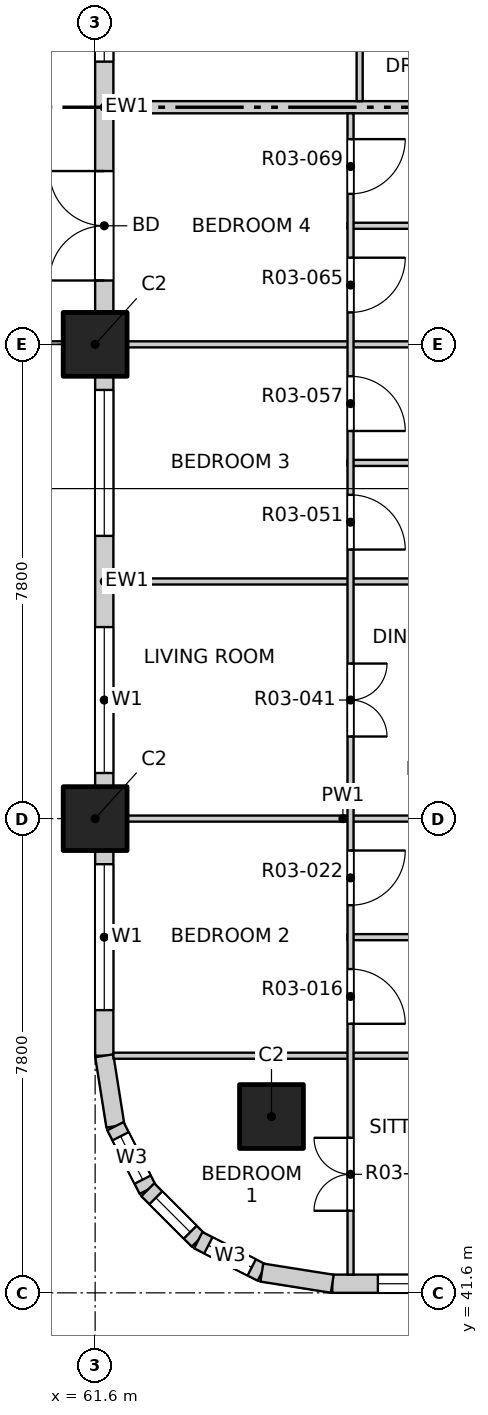
"""IFC4 building model, lengths in metres.
Left out: names, types, materials, properties, quantities, classifications, styles, units other than length and angle.
Written with IfcOpenShell. Run it as: python <this file> out.ifc"""

import sys

from ifc_helpers import new_model, si_unit, direction, frame, frame_2d, origin, origin_2d, place, context, subcontext, project, spatial, rectangle, extrude, element, fill, save


model = new_model("IFC4")
c1 = context("Model", 3, precision=1e-05, world=origin(), true_north=direction((0.0, 1.0)))
c2 = subcontext(c1, "Body", "Model", "MODEL_VIEW")
j1 = project(units=[si_unit("LENGTHUNIT", "METRE"), si_unit("PLANEANGLEUNIT", "RADIAN")], contexts=[c1])
p1 = place(None, origin())
s1 = spatial("IfcSite", under=j1, at=p1, CompositionType="ELEMENT")
p2 = place(p1, origin())
s2 = spatial("IfcBuilding", under=s1, at=p2, CompositionType="ELEMENT")
p3 = place(p2, frame((0.0, 0.0, 39.9)))
s3 = spatial("IfcBuildingStorey", under=s2, at=p3, CompositionType="ELEMENT", Elevation=39.9)
for number, where, z_axis, x_axis in (
    (1, (64.5, 44.5, -0.25), (0.0, 0.0, 1.0), (1.0, 0.0, 0.0)),
    (2, (61.6, 49.4, -0.25), (0.0, 0.0, 1.0), (1.0, 0.0, 0.0)),
    (3, (61.6, 57.2, -0.25), (0.0, 0.0, 1.0), (1.0, 0.0, 0.0)),
):
    element("IfcColumn", number, at=place(p3, frame(where, z_axis=z_axis, x_axis=x_axis)), inside=s3, PredefinedType="COLUMN", context=c2, shape_type="SweptSolid", body=[
        extrude(rectangle(XDim=1.05, YDim=1.05, at=origin_2d()), origin(), (0.0, 0.0, 1.0), 3.4),
    ])
p4 = place(p3, frame((65.5, 41.75, 0.0), z_axis=(0.0, 0.0, 1.0), x_axis=(1.0, 0.0, 0.0)))
e4 = element("IfcWall", 4, at=p4, inside=s3, PredefinedType="SOLIDWALL", context=c2, shape_type="SweptSolid", body=[
    extrude(rectangle(XDim=3.375, YDim=0.3, at=frame_2d((1.688, 0.0))), origin(), (0.0, 0.0, 1.0), 2.7),
])
p5 = place(p4, frame((0.75, 0.0, 0.9)))
e5 = element("IfcOpeningElement", 5, at=p5, cuts=e4, PredefinedType="OPENING", context=c2, shape_type="SweptSolid", body=[
    extrude(rectangle(XDim=2.4, YDim=1.8, at=frame_2d((1.2, 0.9))), frame((0.0, 0.16, 0.0), z_axis=(0.0, -1.0, 0.0), x_axis=(1.0, 0.0, 0.0)), (0.0, 0.0, 1.0), 0.32),
])
p6 = place(p3, frame((61.75, 45.5, 0.0), z_axis=(0.0, 0.0, 1.0), x_axis=(0.0, 1.0, 0.0)))
e6 = element("IfcWall", 6, at=p6, inside=s3, PredefinedType="SOLIDWALL", context=c2, shape_type="SweptSolid", body=[
    extrude(rectangle(XDim=3.375, YDim=0.3, at=frame_2d((1.688, 0.0))), origin(), (0.0, 0.0, 1.0), 2.7),
])
p7 = place(p6, frame((0.75, 0.0, 0.9)))
e7 = element("IfcOpeningElement", 7, at=p7, cuts=e6, PredefinedType="OPENING", context=c2, shape_type="SweptSolid", body=[
    extrude(rectangle(XDim=2.4, YDim=1.8, at=frame_2d((1.2, 0.9))), frame((0.0, 0.16, 0.0), z_axis=(0.0, -1.0, 0.0), x_axis=(1.0, 0.0, 0.0)), (0.0, 0.0, 1.0), 0.32),
])
p8 = place(p3, frame((61.75, 49.925, 0.0), z_axis=(0.0, 0.0, 1.0), x_axis=(0.0, 1.0, 0.0)))
e8 = element("IfcWall", 8, at=p8, inside=s3, PredefinedType="SOLIDWALL", context=c2, shape_type="SweptSolid", body=[
    extrude(rectangle(XDim=6.75, YDim=0.3, at=frame_2d((3.375, 0.0))), origin(), (0.0, 0.0, 1.0), 2.7),
])
p9 = place(p8, frame((0.225, 0.0, 0.9)))
e9 = element("IfcOpeningElement", 9, at=p9, cuts=e8, PredefinedType="OPENING", context=c2, shape_type="SweptSolid", body=[
    extrude(rectangle(XDim=2.4, YDim=1.8, at=frame_2d((1.2, 0.9))), frame((0.0, 0.16, 0.0), z_axis=(0.0, -1.0, 0.0), x_axis=(1.0, 0.0, 0.0)), (0.0, 0.0, 1.0), 0.32),
])
p10 = place(p8, frame((4.125, 0.0, 0.9)))
e10 = element("IfcOpeningElement", 10, at=p10, cuts=e8, PredefinedType="OPENING", context=c2, shape_type="SweptSolid", body=[
    extrude(rectangle(XDim=2.4, YDim=1.8, at=frame_2d((1.2, 0.9))), frame((0.0, 0.16, 0.0), z_axis=(0.0, -1.0, 0.0), x_axis=(1.0, 0.0, 0.0)), (0.0, 0.0, 1.0), 0.32),
])
p11 = place(p3, frame((61.75, 57.725, 0.0), z_axis=(0.0, 0.0, 1.0), x_axis=(0.0, 1.0, 0.0)))
e11 = element("IfcWall", 11, at=p11, inside=s3, PredefinedType="SOLIDWALL", context=c2, shape_type="SweptSolid", body=[
    extrude(rectangle(XDim=6.75, YDim=0.3, at=frame_2d((3.375, 0.0))), origin(), (0.0, 0.0, 1.0), 2.7),
])
p12 = place(p11, frame((0.525, 0.0, 0.0)))
e12 = element("IfcOpeningElement", 12, at=p12, cuts=e11, PredefinedType="OPENING", context=c2, shape_type="SweptSolid", body=[
    extrude(rectangle(XDim=1.8, YDim=2.4, at=frame_2d((0.9, 1.2))), frame((0.0, 0.16, 0.0), z_axis=(0.0, -1.0, 0.0), x_axis=(1.0, 0.0, 0.0)), (0.0, 0.0, 1.0), 0.32),
])
p13 = place(p11, frame((4.125, 0.0, 0.9)))
e13 = element("IfcOpeningElement", 13, at=p13, cuts=e11, PredefinedType="OPENING", context=c2, shape_type="SweptSolid", body=[
    extrude(rectangle(XDim=2.4, YDim=1.8, at=frame_2d((1.2, 0.9))), frame((0.0, 0.16, 0.0), z_axis=(0.0, -1.0, 0.0), x_axis=(1.0, 0.0, 0.0)), (0.0, 0.0, 1.0), 0.32),
])
p14 = place(p3, frame((61.75, 45.5, 0.0), z_axis=(0.0, 0.0, 1.0), x_axis=(0.156496880861, -0.987678452879, 0.0)))
e14 = element("IfcWall", 14, at=p14, inside=s3, PredefinedType="SOLIDWALL", context=c2, shape_type="SweptSolid", body=[
    extrude(rectangle(XDim=1.173, YDim=0.3, at=frame_2d((0.586, 0.0))), origin(), (0.0, 0.0, 1.0), 2.7),
])
p15 = place(p3, frame((61.934, 44.341, 0.0), z_axis=(0.0, 0.0, 1.0), x_axis=(0.454025524128, -0.890988677504, 0.0)))
e15 = element("IfcWall", 15, at=p15, inside=s3, PredefinedType="SOLIDWALL", context=c2, shape_type="SweptSolid", body=[
    extrude(rectangle(XDim=1.173, YDim=0.3, at=frame_2d((0.587, 0.0))), origin(), (0.0, 0.0, 1.0), 2.7),
])
p16 = place(p15, frame((0.187, 0.0, 0.9)))
e16 = element("IfcOpeningElement", 16, at=p16, cuts=e15, PredefinedType="OPENING", context=c2, shape_type="SweptSolid", body=[
    extrude(rectangle(XDim=0.8, YDim=1.2, at=frame_2d((0.4, 0.6))), frame((0.0, 0.16, 0.0), z_axis=(0.0, -1.0, 0.0), x_axis=(1.0, 0.0, 0.0)), (0.0, 0.0, 1.0), 0.32),
])
p17 = place(p3, frame((62.466, 43.296, 0.0), z_axis=(0.0, 0.0, 1.0), x_axis=(0.707106781187, -0.707106781187, 0.0)))
e17 = element("IfcWall", 17, at=p17, inside=s3, PredefinedType="SOLIDWALL", context=c2, shape_type="SweptSolid", body=[
    extrude(rectangle(XDim=1.173, YDim=0.3, at=frame_2d((0.586, 0.0))), origin(), (0.0, 0.0, 1.0), 2.7),
])
p18 = place(p17, frame((0.187, 0.0, 0.9)))
e18 = element("IfcOpeningElement", 18, at=p18, cuts=e17, PredefinedType="OPENING", context=c2, shape_type="SweptSolid", body=[
    extrude(rectangle(XDim=0.8, YDim=1.2, at=frame_2d((0.4, 0.6))), frame((0.0, 0.16, 0.0), z_axis=(0.0, -1.0, 0.0), x_axis=(1.0, 0.0, 0.0)), (0.0, 0.0, 1.0), 0.32),
])
p19 = place(p3, frame((63.296, 42.466, 0.0), z_axis=(0.0, 0.0, 1.0), x_axis=(0.890988677504, -0.454025524128, 0.0)))
e19 = element("IfcWall", 19, at=p19, inside=s3, PredefinedType="SOLIDWALL", context=c2, shape_type="SweptSolid", body=[
    extrude(rectangle(XDim=1.173, YDim=0.3, at=frame_2d((0.587, 0.0))), origin(), (0.0, 0.0, 1.0), 2.7),
])
p20 = place(p19, frame((0.187, 0.0, 0.9)))
e20 = element("IfcOpeningElement", 20, at=p20, cuts=e19, PredefinedType="OPENING", context=c2, shape_type="SweptSolid", body=[
    extrude(rectangle(XDim=0.8, YDim=1.2, at=frame_2d((0.4, 0.6))), frame((0.0, 0.16, 0.0), z_axis=(0.0, -1.0, 0.0), x_axis=(1.0, 0.0, 0.0)), (0.0, 0.0, 1.0), 0.32),
])
p21 = place(p3, frame((64.341, 41.934, 0.0), z_axis=(0.0, 0.0, 1.0), x_axis=(0.987678452879, -0.156496880861, 0.0)))
e21 = element("IfcWall", 21, at=p21, inside=s3, PredefinedType="SOLIDWALL", context=c2, shape_type="SweptSolid", body=[
    extrude(rectangle(XDim=1.173, YDim=0.3, at=frame_2d((0.586, 0.0))), origin(), (0.0, 0.0, 1.0), 2.7),
])
p22 = place(p3, frame((61.9, 45.5, 0.0), z_axis=(0.0, 0.0, 1.0), x_axis=(1.0, 0.0, 0.0)))
e22 = element("IfcWall", 22, at=p22, inside=s3, PredefinedType="PARTITIONING", context=c2, shape_type="SweptSolid", body=[
    extrude(rectangle(XDim=11.5, YDim=0.1, at=frame_2d((5.75, 0.0))), origin(), (0.0, 0.0, 1.0), 3.15),
])
p23 = place(p22, frame((7.965, 0.0, 0.0)))
e23 = element("IfcOpeningElement", 23, at=p23, cuts=e22, PredefinedType="OPENING", context=c2, shape_type="SweptSolid", body=[
    extrude(rectangle(XDim=0.9, YDim=2.1, at=frame_2d((0.45, 1.05))), frame((0.0, 0.06, 0.0), z_axis=(0.0, -1.0, 0.0), x_axis=(1.0, 0.0, 0.0)), (0.0, 0.0, 1.0), 0.12),
])
p24 = place(p3, frame((65.75, 47.45, 0.0), z_axis=(0.0, 0.0, 1.0), x_axis=(1.0, 0.0, 0.0)))
e24 = element("IfcWall", 24, at=p24, inside=s3, PredefinedType="PARTITIONING", context=c2, shape_type="SweptSolid", body=[
    extrude(rectangle(XDim=3.7, YDim=0.1, at=frame_2d((1.85, 0.0))), origin(), (0.0, 0.0, 1.0), 3.15),
])
for number, where, z_axis, x_axis in (
    (25, (61.9, 49.4, 0.0), (0.0, 0.0, 1.0), (1.0, 0.0, 0.0)),
    (26, (61.9, 53.3, 0.0), (0.0, 0.0, 1.0), (1.0, 0.0, 0.0)),
):
    element("IfcWall", number, at=place(p3, frame(where, z_axis=z_axis, x_axis=x_axis)), inside=s3, PredefinedType="PARTITIONING", context=c2, shape_type="SweptSolid", body=[
        extrude(rectangle(XDim=7.55, YDim=0.1, at=frame_2d((3.775, 0.0))), origin(), (0.0, 0.0, 1.0), 3.15),
    ])
p25 = place(p3, frame((65.75, 55.25, 0.0), z_axis=(0.0, 0.0, 1.0), x_axis=(1.0, 0.0, 0.0)))
e27 = element("IfcWall", 27, at=p25, inside=s3, PredefinedType="PARTITIONING", context=c2, shape_type="SweptSolid", body=[
    extrude(rectangle(XDim=3.7, YDim=0.1, at=frame_2d((1.85, 0.0))), origin(), (0.0, 0.0, 1.0), 3.15),
])
p26 = place(p3, frame((61.9, 57.2, 0.0), z_axis=(0.0, 0.0, 1.0), x_axis=(1.0, 0.0, 0.0)))
e28 = element("IfcWall", 28, at=p26, inside=s3, PredefinedType="PARTITIONING", context=c2, shape_type="SweptSolid", body=[
    extrude(rectangle(XDim=7.55, YDim=0.1, at=frame_2d((3.775, 0.0))), origin(), (0.0, 0.0, 1.0), 2.55),
])
p27 = place(p3, frame((65.75, 59.15, 0.0), z_axis=(0.0, 0.0, 1.0), x_axis=(1.0, 0.0, 0.0)))
e29 = element("IfcWall", 29, at=p27, inside=s3, PredefinedType="PARTITIONING", context=c2, shape_type="SweptSolid", body=[
    extrude(rectangle(XDim=3.7, YDim=0.1, at=frame_2d((1.85, 0.0))), origin(), (0.0, 0.0, 1.0), 3.15),
])
p28 = place(p3, frame((61.9, 61.1, 0.0), z_axis=(0.0, 0.0, 1.0), x_axis=(1.0, 0.0, 0.0)))
e30 = element("IfcWall", 30, at=p28, inside=s3, PredefinedType="PARTITIONING", context=c2, shape_type="SweptSolid", body=[
    extrude(rectangle(XDim=11.5, YDim=0.2, at=frame_2d((5.75, 0.0))), origin(), (0.0, 0.0, 1.0), 3.15),
])
p29 = place(p3, frame((65.8, 41.9, 0.0), z_axis=(0.0, 0.0, 1.0), x_axis=(0.0, 1.0, 0.0)))
e31 = element("IfcWall", 31, at=p29, inside=s3, PredefinedType="PARTITIONING", context=c2, shape_type="SweptSolid", body=[
    extrude(rectangle(XDim=19.1, YDim=0.1, at=frame_2d((9.55, 0.0))), origin(), (0.0, 0.0, 1.0), 3.15),
])
p30 = place(p29, frame((1.05, 0.0, 0.0)))
e32 = element("IfcOpeningElement", 32, at=p30, cuts=e31, PredefinedType="OPENING", context=c2, shape_type="SweptSolid", body=[
    extrude(rectangle(XDim=1.2, YDim=2.1, at=frame_2d((0.6, 1.05))), frame((0.0, 0.06, 0.0), z_axis=(0.0, -1.0, 0.0), x_axis=(1.0, 0.0, 0.0)), (0.0, 0.0, 1.0), 0.12),
])
p31 = place(p29, frame((4.125, 0.0, 0.0)))
e33 = element("IfcOpeningElement", 33, at=p31, cuts=e31, PredefinedType="OPENING", context=c2, shape_type="SweptSolid", body=[
    extrude(rectangle(XDim=0.9, YDim=2.1, at=frame_2d((0.45, 1.05))), frame((0.0, 0.06, 0.0), z_axis=(0.0, -1.0, 0.0), x_axis=(1.0, 0.0, 0.0)), (0.0, 0.0, 1.0), 0.12),
])
p32 = place(p29, frame((6.075, 0.0, 0.0)))
e34 = element("IfcOpeningElement", 34, at=p32, cuts=e31, PredefinedType="OPENING", context=c2, shape_type="SweptSolid", body=[
    extrude(rectangle(XDim=0.9, YDim=2.1, at=frame_2d((0.45, 1.05))), frame((0.0, 0.06, 0.0), z_axis=(0.0, -1.0, 0.0), x_axis=(1.0, 0.0, 0.0)), (0.0, 0.0, 1.0), 0.12),
])
p33 = place(p29, frame((8.85, 0.0, 0.0)))
e35 = element("IfcOpeningElement", 35, at=p33, cuts=e31, PredefinedType="OPENING", context=c2, shape_type="SweptSolid", body=[
    extrude(rectangle(XDim=1.2, YDim=2.1, at=frame_2d((0.6, 1.05))), frame((0.0, 0.06, 0.0), z_axis=(0.0, -1.0, 0.0), x_axis=(1.0, 0.0, 0.0)), (0.0, 0.0, 1.0), 0.12),
])
p34 = place(p29, frame((11.925, 0.0, 0.0)))
e36 = element("IfcOpeningElement", 36, at=p34, cuts=e31, PredefinedType="OPENING", context=c2, shape_type="SweptSolid", body=[
    extrude(rectangle(XDim=0.9, YDim=2.1, at=frame_2d((0.45, 1.05))), frame((0.0, 0.06, 0.0), z_axis=(0.0, -1.0, 0.0), x_axis=(1.0, 0.0, 0.0)), (0.0, 0.0, 1.0), 0.12),
])
p35 = place(p29, frame((13.875, 0.0, 0.0)))
e37 = element("IfcOpeningElement", 37, at=p35, cuts=e31, PredefinedType="OPENING", context=c2, shape_type="SweptSolid", body=[
    extrude(rectangle(XDim=0.9, YDim=2.1, at=frame_2d((0.45, 1.05))), frame((0.0, 0.06, 0.0), z_axis=(0.0, -1.0, 0.0), x_axis=(1.0, 0.0, 0.0)), (0.0, 0.0, 1.0), 0.12),
])
p36 = place(p29, frame((15.825, 0.0, 0.0)))
e38 = element("IfcOpeningElement", 38, at=p36, cuts=e31, PredefinedType="OPENING", context=c2, shape_type="SweptSolid", body=[
    extrude(rectangle(XDim=0.9, YDim=2.1, at=frame_2d((0.45, 1.05))), frame((0.0, 0.06, 0.0), z_axis=(0.0, -1.0, 0.0), x_axis=(1.0, 0.0, 0.0)), (0.0, 0.0, 1.0), 0.12),
])
p37 = place(p29, frame((17.775, 0.0, 0.0)))
e39 = element("IfcOpeningElement", 39, at=p37, cuts=e31, PredefinedType="OPENING", context=c2, shape_type="SweptSolid", body=[
    extrude(rectangle(XDim=0.9, YDim=2.1, at=frame_2d((0.45, 1.05))), frame((0.0, 0.06, 0.0), z_axis=(0.0, -1.0, 0.0), x_axis=(1.0, 0.0, 0.0)), (0.0, 0.0, 1.0), 0.12),
])
p38 = place(p3, frame((65.95, 61.2, 0.0), z_axis=(0.0, 0.0, 1.0), x_axis=(0.0, 1.0, 0.0)))
e40 = element("IfcWall", 40, at=p38, inside=s3, PredefinedType="PARTITIONING", context=c2, shape_type="SweptSolid", body=[
    extrude(rectangle(XDim=7.6, YDim=0.1, at=frame_2d((3.8, 0.0))), origin(), (0.0, 0.0, 1.0), 3.15),
])
p39 = place(p38, frame((1.25, 0.0, 0.0)))
e41 = element("IfcOpeningElement", 41, at=p39, cuts=e40, PredefinedType="OPENING", context=c2, shape_type="SweptSolid", body=[
    extrude(rectangle(XDim=1.2, YDim=2.1, at=frame_2d((0.6, 1.05))), frame((0.0, 0.06, 0.0), z_axis=(0.0, -1.0, 0.0), x_axis=(1.0, 0.0, 0.0)), (0.0, 0.0, 1.0), 0.12),
])
p40 = place(p38, frame((4.325, 0.0, 0.0)))
e42 = element("IfcOpeningElement", 42, at=p40, cuts=e40, PredefinedType="OPENING", context=c2, shape_type="SweptSolid", body=[
    extrude(rectangle(XDim=0.9, YDim=2.1, at=frame_2d((0.45, 1.05))), frame((0.0, 0.06, 0.0), z_axis=(0.0, -1.0, 0.0), x_axis=(1.0, 0.0, 0.0)), (0.0, 0.0, 1.0), 0.12),
])
p41 = place(p38, frame((6.275, 0.0, 0.0)))
e43 = element("IfcOpeningElement", 43, at=p41, cuts=e40, PredefinedType="OPENING", context=c2, shape_type="SweptSolid", body=[
    extrude(rectangle(XDim=0.9, YDim=2.1, at=frame_2d((0.45, 1.05))), frame((0.0, 0.06, 0.0), z_axis=(0.0, -1.0, 0.0), x_axis=(1.0, 0.0, 0.0)), (0.0, 0.0, 1.0), 0.12),
])
p42 = place(p5, origin())
e44 = element("IfcWindow", 44, at=p42, inside=s3, PartitioningType="DOUBLE_PANEL_VERTICAL", PredefinedType="WINDOW", context=c2, shape_type="SweptSolid", body=[
    extrude(rectangle(XDim=2.4, YDim=1.8, at=frame_2d((1.2, 0.9))), frame((0.0, 0.03, 0.0), z_axis=(0.0, -1.0, 0.0), x_axis=(1.0, 0.0, 0.0)), (0.0, 0.0, 1.0), 0.06),
])
fill(e5, e44)
p43 = place(p7, origin())
e45 = element("IfcWindow", 45, at=p43, inside=s3, PartitioningType="DOUBLE_PANEL_VERTICAL", PredefinedType="WINDOW", context=c2, shape_type="SweptSolid", body=[
    extrude(rectangle(XDim=2.4, YDim=1.8, at=frame_2d((1.2, 0.9))), frame((0.0, 0.03, 0.0), z_axis=(0.0, -1.0, 0.0), x_axis=(1.0, 0.0, 0.0)), (0.0, 0.0, 1.0), 0.06),
])
fill(e7, e45)
p44 = place(p9, origin())
e46 = element("IfcWindow", 46, at=p44, inside=s3, PartitioningType="DOUBLE_PANEL_VERTICAL", PredefinedType="WINDOW", context=c2, shape_type="SweptSolid", body=[
    extrude(rectangle(XDim=2.4, YDim=1.8, at=frame_2d((1.2, 0.9))), frame((0.0, 0.03, 0.0), z_axis=(0.0, -1.0, 0.0), x_axis=(1.0, 0.0, 0.0)), (0.0, 0.0, 1.0), 0.06),
])
fill(e9, e46)
p45 = place(p10, origin())
e47 = element("IfcWindow", 47, at=p45, inside=s3, PartitioningType="DOUBLE_PANEL_VERTICAL", PredefinedType="WINDOW", context=c2, shape_type="SweptSolid", body=[
    extrude(rectangle(XDim=2.4, YDim=1.8, at=frame_2d((1.2, 0.9))), frame((0.0, 0.03, 0.0), z_axis=(0.0, -1.0, 0.0), x_axis=(1.0, 0.0, 0.0)), (0.0, 0.0, 1.0), 0.06),
])
fill(e10, e47)
p46 = place(p12, origin())
e48 = element("IfcDoor", 48, at=p46, inside=s3, OperationType="DOUBLE_DOOR_SINGLE_SWING", PredefinedType="DOOR", context=c2, shape_type="SweptSolid", body=[
    extrude(rectangle(XDim=1.8, YDim=2.4, at=frame_2d((0.9, 1.2))), frame((0.0, 0.025, 0.0), z_axis=(0.0, -1.0, 0.0), x_axis=(1.0, 0.0, 0.0)), (0.0, 0.0, 1.0), 0.05),
])
fill(e12, e48)
p47 = place(p13, origin())
e49 = element("IfcWindow", 49, at=p47, inside=s3, PartitioningType="DOUBLE_PANEL_VERTICAL", PredefinedType="WINDOW", context=c2, shape_type="SweptSolid", body=[
    extrude(rectangle(XDim=2.4, YDim=1.8, at=frame_2d((1.2, 0.9))), frame((0.0, 0.03, 0.0), z_axis=(0.0, -1.0, 0.0), x_axis=(1.0, 0.0, 0.0)), (0.0, 0.0, 1.0), 0.06),
])
fill(e13, e49)
p48 = place(p16, origin())
e50 = element("IfcWindow", 50, at=p48, inside=s3, PartitioningType="SINGLE_PANEL", PredefinedType="WINDOW", context=c2, shape_type="SweptSolid", body=[
    extrude(rectangle(XDim=0.8, YDim=1.2, at=frame_2d((0.4, 0.6))), frame((0.0, 0.03, 0.0), z_axis=(0.0, -1.0, 0.0), x_axis=(1.0, 0.0, 0.0)), (0.0, 0.0, 1.0), 0.06),
])
fill(e16, e50)
p49 = place(p18, origin())
e51 = element("IfcWindow", 51, at=p49, inside=s3, PartitioningType="SINGLE_PANEL", PredefinedType="WINDOW", context=c2, shape_type="SweptSolid", body=[
    extrude(rectangle(XDim=0.8, YDim=1.2, at=frame_2d((0.4, 0.6))), frame((0.0, 0.03, 0.0), z_axis=(0.0, -1.0, 0.0), x_axis=(1.0, 0.0, 0.0)), (0.0, 0.0, 1.0), 0.06),
])
fill(e18, e51)
p50 = place(p20, origin())
e52 = element("IfcWindow", 52, at=p50, inside=s3, PartitioningType="SINGLE_PANEL", PredefinedType="WINDOW", context=c2, shape_type="SweptSolid", body=[
    extrude(rectangle(XDim=0.8, YDim=1.2, at=frame_2d((0.4, 0.6))), frame((0.0, 0.03, 0.0), z_axis=(0.0, -1.0, 0.0), x_axis=(1.0, 0.0, 0.0)), (0.0, 0.0, 1.0), 0.06),
])
fill(e20, e52)
p51 = place(p30, origin())
e53 = element("IfcDoor", 53, at=p51, inside=s3, OperationType="DOUBLE_DOOR_SINGLE_SWING", PredefinedType="DOOR", context=c2, shape_type="SweptSolid", body=[
    extrude(rectangle(XDim=1.2, YDim=2.1, at=frame_2d((0.6, 1.05))), frame((0.0, 0.025, 0.0), z_axis=(0.0, -1.0, 0.0), x_axis=(1.0, 0.0, 0.0)), (0.0, 0.0, 1.0), 0.05),
])
fill(e32, e53)
p52 = place(p31, origin())
e54 = element("IfcDoor", 54, at=p52, inside=s3, OperationType="SINGLE_SWING_RIGHT", PredefinedType="DOOR", context=c2, shape_type="SweptSolid", body=[
    extrude(rectangle(XDim=0.9, YDim=2.1, at=frame_2d((0.45, 1.05))), frame((0.0, 0.025, 0.0), z_axis=(0.0, -1.0, 0.0), x_axis=(1.0, 0.0, 0.0)), (0.0, 0.0, 1.0), 0.05),
])
fill(e33, e54)
p53 = place(p32, origin())
e55 = element("IfcDoor", 55, at=p53, inside=s3, OperationType="SINGLE_SWING_LEFT", PredefinedType="DOOR", context=c2, shape_type="SweptSolid", body=[
    extrude(rectangle(XDim=0.9, YDim=2.1, at=frame_2d((0.45, 1.05))), frame((0.0, 0.025, 0.0), z_axis=(0.0, -1.0, 0.0), x_axis=(1.0, 0.0, 0.0)), (0.0, 0.0, 1.0), 0.05),
])
fill(e34, e55)
p54 = place(p33, origin())
e56 = element("IfcDoor", 56, at=p54, inside=s3, OperationType="DOUBLE_DOOR_SINGLE_SWING", PredefinedType="DOOR", context=c2, shape_type="SweptSolid", body=[
    extrude(rectangle(XDim=1.2, YDim=2.1, at=frame_2d((0.6, 1.05))), frame((0.0, 0.025, 0.0), z_axis=(0.0, -1.0, 0.0), x_axis=(1.0, 0.0, 0.0)), (0.0, 0.0, 1.0), 0.05),
])
fill(e35, e56)
p55 = place(p34, origin())
e57 = element("IfcDoor", 57, at=p55, inside=s3, OperationType="SINGLE_SWING_RIGHT", PredefinedType="DOOR", context=c2, shape_type="SweptSolid", body=[
    extrude(rectangle(XDim=0.9, YDim=2.1, at=frame_2d((0.45, 1.05))), frame((0.0, 0.025, 0.0), z_axis=(0.0, -1.0, 0.0), x_axis=(1.0, 0.0, 0.0)), (0.0, 0.0, 1.0), 0.05),
])
fill(e36, e57)
p56 = place(p35, origin())
e58 = element("IfcDoor", 58, at=p56, inside=s3, OperationType="SINGLE_SWING_RIGHT", PredefinedType="DOOR", context=c2, shape_type="SweptSolid", body=[
    extrude(rectangle(XDim=0.9, YDim=2.1, at=frame_2d((0.45, 1.05))), frame((0.0, 0.025, 0.0), z_axis=(0.0, -1.0, 0.0), x_axis=(1.0, 0.0, 0.0)), (0.0, 0.0, 1.0), 0.05),
])
fill(e37, e58)
p57 = place(p36, origin())
e59 = element("IfcDoor", 59, at=p57, inside=s3, OperationType="SINGLE_SWING_LEFT", PredefinedType="DOOR", context=c2, shape_type="SweptSolid", body=[
    extrude(rectangle(XDim=0.9, YDim=2.1, at=frame_2d((0.45, 1.05))), frame((0.0, 0.025, 0.0), z_axis=(0.0, -1.0, 0.0), x_axis=(1.0, 0.0, 0.0)), (0.0, 0.0, 1.0), 0.05),
])
fill(e38, e59)
p58 = place(p37, origin())
e60 = element("IfcDoor", 60, at=p58, inside=s3, OperationType="SINGLE_SWING_LEFT", PredefinedType="DOOR", context=c2, shape_type="SweptSolid", body=[
    extrude(rectangle(XDim=0.9, YDim=2.1, at=frame_2d((0.45, 1.05))), frame((0.0, 0.025, 0.0), z_axis=(0.0, -1.0, 0.0), x_axis=(1.0, 0.0, 0.0)), (0.0, 0.0, 1.0), 0.05),
])
fill(e39, e60)
save(model, sys.argv[1])
